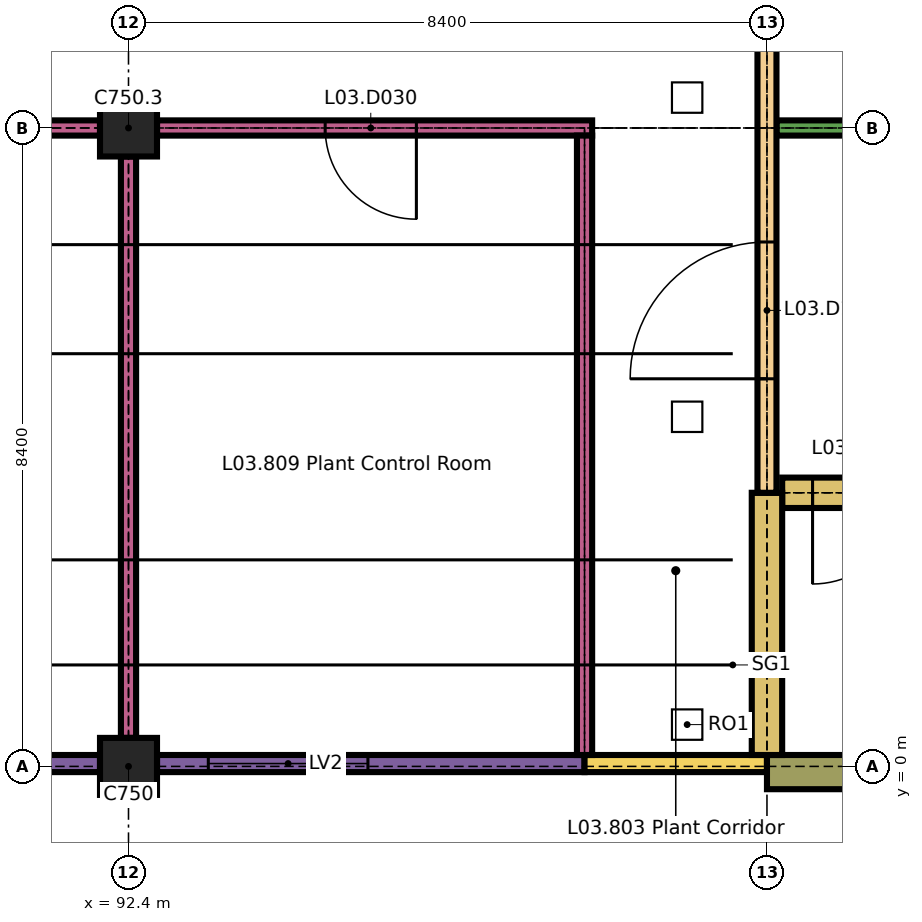
"""IFC4 building model, lengths in metres.
Left out: names, types, materials, properties, quantities, classifications, styles, units other than length and angle.
Written with IfcOpenShell. Run it as: python <this file> out.ifc"""

import sys

from ifc_helpers import new_model, si_unit, direction, frame, frame_2d, origin, origin_2d, place, context, subcontext, project, spatial, rectangle, extrude, element, fill, save


model = new_model("IFC4")
c1 = context("Model", 3, precision=1e-05, world=origin(), true_north=direction((0.0, 1.0)))
c2 = subcontext(c1, "Body", "Model", "MODEL_VIEW")
j1 = project(units=[si_unit("LENGTHUNIT", "METRE"), si_unit("PLANEANGLEUNIT", "RADIAN")], contexts=[c1])
p1 = place(None, origin())
s1 = spatial("IfcSite", under=j1, at=p1, CompositionType="ELEMENT")
p2 = place(p1, origin())
s2 = spatial("IfcBuilding", under=s1, at=p2, CompositionType="ELEMENT")
p3 = place(p2, frame((0.0, 0.0, 15.3)))
s3 = spatial("IfcBuildingStorey", under=s2, at=p3, CompositionType="ELEMENT", Elevation=15.3)
for number, where, z_axis, x_axis in (
    (1, (92.4, 0.0, 0.0), (0.0, 0.0, 1.0), (1.0, 0.0, 0.0)),
    (2, (92.4, 8.4, 0.0), (0.0, 0.0, 1.0), (1.0, 0.0, 0.0)),
):
    element("IfcColumn", number, at=place(p3, frame(where, z_axis=z_axis, x_axis=x_axis)), inside=s3, PredefinedType="COLUMN", context=c2, shape_type="SweptSolid", body=[
        extrude(rectangle(XDim=0.75, YDim=0.75, at=origin_2d()), origin(), (0.0, 0.0, 1.0), 4.0),
    ])
p4 = place(p3, frame((84.375, 0.038, 0.0), z_axis=(0.0, 0.0, 1.0), x_axis=(1.0, 0.0, 0.0)))
e3 = element("IfcWall", 3, at=p4, inside=s3, PredefinedType="SOLIDWALL", context=c2, shape_type="SweptSolid", body=[
    extrude(rectangle(XDim=7.65, YDim=0.225, at=frame_2d((3.825, 0.0))), origin(), (0.0, 0.0, 1.0), 4.0),
])
p5 = place(p4, frame((0.675, 0.0, 0.6)))
e4 = element("IfcOpeningElement", 4, at=p5, cuts=e3, PredefinedType="OPENING", context=c2, shape_type="SweptSolid", body=[
    extrude(rectangle(XDim=2.1, YDim=2.1, at=frame_2d((1.05, 1.05))), frame((0.0, 0.123, 0.0), z_axis=(0.0, -1.0, 0.0), x_axis=(1.0, 0.0, 0.0)), (0.0, 0.0, 1.0), 0.245),
])
p6 = place(p4, frame((4.875, 0.0, 0.6)))
e5 = element("IfcOpeningElement", 5, at=p6, cuts=e3, PredefinedType="OPENING", context=c2, shape_type="SweptSolid", body=[
    extrude(rectangle(XDim=2.1, YDim=2.1, at=frame_2d((1.05, 1.05))), frame((0.0, 0.123, 0.0), z_axis=(0.0, -1.0, 0.0), x_axis=(1.0, 0.0, 0.0)), (0.0, 0.0, 1.0), 0.245),
])
p7 = place(p3, frame((92.775, 0.038, 0.0), z_axis=(0.0, 0.0, 1.0), x_axis=(1.0, 0.0, 0.0)))
e6 = element("IfcWall", 6, at=p7, inside=s3, PredefinedType="SOLIDWALL", context=c2, shape_type="SweptSolid", body=[
    extrude(rectangle(XDim=5.625, YDim=0.225, at=frame_2d((2.812, 0.0))), origin(), (0.0, 0.0, 1.0), 4.0),
])
p8 = place(p7, frame((0.675, 0.0, 0.6)))
e7 = element("IfcOpeningElement", 7, at=p8, cuts=e6, PredefinedType="OPENING", context=c2, shape_type="SweptSolid", body=[
    extrude(rectangle(XDim=2.1, YDim=2.1, at=frame_2d((1.05, 1.05))), frame((0.0, 0.123, 0.0), z_axis=(0.0, -1.0, 0.0), x_axis=(1.0, 0.0, 0.0)), (0.0, 0.0, 1.0), 0.245),
])
p9 = place(p3, frame((98.4, 0.038, 0.0), z_axis=(0.0, 0.0, 1.0), x_axis=(1.0, 0.0, 0.0)))
e8 = element("IfcWall", 8, at=p9, inside=s3, PredefinedType="SOLIDWALL", context=c2, shape_type="SweptSolid", body=[
    extrude(rectangle(XDim=2.4, YDim=0.225, at=frame_2d((1.2, 0.0))), origin(), (0.0, 0.0, 1.0), 3.26),
])
p10 = place(p3, frame((100.8, -0.075, 0.0), z_axis=(0.0, 0.0, 1.0), x_axis=(1.0, 0.0, 0.0)))
e9 = element("IfcWall", 9, at=p10, inside=s3, PredefinedType="SOLIDWALL", context=c2, shape_type="SweptSolid", body=[
    extrude(rectangle(XDim=3.15, YDim=0.45, at=frame_2d((1.575, 0.0))), origin(), (0.0, 0.0, 1.0), 3.26),
])
p11 = place(p3, frame((42.21, 4.2, 4.904), z_axis=(0.0, 0.0, 1.0), x_axis=(1.0, 0.0, 0.0)))
e10 = element("IfcWall", 10, at=p11, inside=s3, PredefinedType="SOLIDWALL", context=c2, shape_type="SweptSolid", body=[
    extrude(rectangle(XDim=58.38, YDim=0.2, at=frame_2d((29.19, 0.0))), origin(), (0.0, 0.0, 1.0), 2.539),
])
p12 = place(p11, frame((1.05, 0.0, 0.3)))
e11 = element("IfcOpeningElement", 11, at=p12, cuts=e10, PredefinedType="OPENING", context=c2, shape_type="SweptSolid", body=[
    extrude(rectangle(XDim=2.1, YDim=1.8, at=frame_2d((1.05, 0.9))), frame((0.0, 0.11, 0.0), z_axis=(0.0, -1.0, 0.0), x_axis=(1.0, 0.0, 0.0)), (0.0, 0.0, 1.0), 0.22),
])
p13 = place(p11, frame((5.25, 0.0, 0.3)))
e12 = element("IfcOpeningElement", 12, at=p13, cuts=e10, PredefinedType="OPENING", context=c2, shape_type="SweptSolid", body=[
    extrude(rectangle(XDim=2.1, YDim=1.8, at=frame_2d((1.05, 0.9))), frame((0.0, 0.11, 0.0), z_axis=(0.0, -1.0, 0.0), x_axis=(1.0, 0.0, 0.0)), (0.0, 0.0, 1.0), 0.22),
])
p14 = place(p11, frame((9.45, 0.0, 0.3)))
e13 = element("IfcOpeningElement", 13, at=p14, cuts=e10, PredefinedType="OPENING", context=c2, shape_type="SweptSolid", body=[
    extrude(rectangle(XDim=2.1, YDim=1.8, at=frame_2d((1.05, 0.9))), frame((0.0, 0.11, 0.0), z_axis=(0.0, -1.0, 0.0), x_axis=(1.0, 0.0, 0.0)), (0.0, 0.0, 1.0), 0.22),
])
p15 = place(p11, frame((13.65, 0.0, 0.3)))
e14 = element("IfcOpeningElement", 14, at=p15, cuts=e10, PredefinedType="OPENING", context=c2, shape_type="SweptSolid", body=[
    extrude(rectangle(XDim=2.1, YDim=1.8, at=frame_2d((1.05, 0.9))), frame((0.0, 0.11, 0.0), z_axis=(0.0, -1.0, 0.0), x_axis=(1.0, 0.0, 0.0)), (0.0, 0.0, 1.0), 0.22),
])
p16 = place(p11, frame((17.85, 0.0, 0.3)))
e15 = element("IfcOpeningElement", 15, at=p16, cuts=e10, PredefinedType="OPENING", context=c2, shape_type="SweptSolid", body=[
    extrude(rectangle(XDim=2.1, YDim=1.8, at=frame_2d((1.05, 0.9))), frame((0.0, 0.11, 0.0), z_axis=(0.0, -1.0, 0.0), x_axis=(1.0, 0.0, 0.0)), (0.0, 0.0, 1.0), 0.22),
])
p17 = place(p11, frame((22.05, 0.0, 0.3)))
e16 = element("IfcOpeningElement", 16, at=p17, cuts=e10, PredefinedType="OPENING", context=c2, shape_type="SweptSolid", body=[
    extrude(rectangle(XDim=2.1, YDim=1.8, at=frame_2d((1.05, 0.9))), frame((0.0, 0.11, 0.0), z_axis=(0.0, -1.0, 0.0), x_axis=(1.0, 0.0, 0.0)), (0.0, 0.0, 1.0), 0.22),
])
p18 = place(p11, frame((26.25, 0.0, 0.3)))
e17 = element("IfcOpeningElement", 17, at=p18, cuts=e10, PredefinedType="OPENING", context=c2, shape_type="SweptSolid", body=[
    extrude(rectangle(XDim=2.1, YDim=1.8, at=frame_2d((1.05, 0.9))), frame((0.0, 0.11, 0.0), z_axis=(0.0, -1.0, 0.0), x_axis=(1.0, 0.0, 0.0)), (0.0, 0.0, 1.0), 0.22),
])
p19 = place(p11, frame((30.45, 0.0, 0.3)))
e18 = element("IfcOpeningElement", 18, at=p19, cuts=e10, PredefinedType="OPENING", context=c2, shape_type="SweptSolid", body=[
    extrude(rectangle(XDim=2.1, YDim=1.8, at=frame_2d((1.05, 0.9))), frame((0.0, 0.11, 0.0), z_axis=(0.0, -1.0, 0.0), x_axis=(1.0, 0.0, 0.0)), (0.0, 0.0, 1.0), 0.22),
])
p20 = place(p11, frame((34.65, 0.0, 0.3)))
e19 = element("IfcOpeningElement", 19, at=p20, cuts=e10, PredefinedType="OPENING", context=c2, shape_type="SweptSolid", body=[
    extrude(rectangle(XDim=2.1, YDim=1.8, at=frame_2d((1.05, 0.9))), frame((0.0, 0.11, 0.0), z_axis=(0.0, -1.0, 0.0), x_axis=(1.0, 0.0, 0.0)), (0.0, 0.0, 1.0), 0.22),
])
p21 = place(p11, frame((38.85, 0.0, 0.3)))
e20 = element("IfcOpeningElement", 20, at=p21, cuts=e10, PredefinedType="OPENING", context=c2, shape_type="SweptSolid", body=[
    extrude(rectangle(XDim=2.1, YDim=1.8, at=frame_2d((1.05, 0.9))), frame((0.0, 0.11, 0.0), z_axis=(0.0, -1.0, 0.0), x_axis=(1.0, 0.0, 0.0)), (0.0, 0.0, 1.0), 0.22),
])
p22 = place(p11, frame((43.05, 0.0, 0.3)))
e21 = element("IfcOpeningElement", 21, at=p22, cuts=e10, PredefinedType="OPENING", context=c2, shape_type="SweptSolid", body=[
    extrude(rectangle(XDim=2.1, YDim=1.8, at=frame_2d((1.05, 0.9))), frame((0.0, 0.11, 0.0), z_axis=(0.0, -1.0, 0.0), x_axis=(1.0, 0.0, 0.0)), (0.0, 0.0, 1.0), 0.22),
])
p23 = place(p11, frame((47.25, 0.0, 0.3)))
e22 = element("IfcOpeningElement", 22, at=p23, cuts=e10, PredefinedType="OPENING", context=c2, shape_type="SweptSolid", body=[
    extrude(rectangle(XDim=2.1, YDim=1.8, at=frame_2d((1.05, 0.9))), frame((0.0, 0.11, 0.0), z_axis=(0.0, -1.0, 0.0), x_axis=(1.0, 0.0, 0.0)), (0.0, 0.0, 1.0), 0.22),
])
p24 = place(p11, frame((51.45, 0.0, 0.3)))
e23 = element("IfcOpeningElement", 23, at=p24, cuts=e10, PredefinedType="OPENING", context=c2, shape_type="SweptSolid", body=[
    extrude(rectangle(XDim=2.1, YDim=1.8, at=frame_2d((1.05, 0.9))), frame((0.0, 0.11, 0.0), z_axis=(0.0, -1.0, 0.0), x_axis=(1.0, 0.0, 0.0)), (0.0, 0.0, 1.0), 0.22),
])
p25 = place(p11, frame((55.65, 0.0, 0.3)))
e24 = element("IfcOpeningElement", 24, at=p25, cuts=e10, PredefinedType="OPENING", context=c2, shape_type="SweptSolid", body=[
    extrude(rectangle(XDim=2.1, YDim=1.8, at=frame_2d((1.05, 0.9))), frame((0.0, 0.11, 0.0), z_axis=(0.0, -1.0, 0.0), x_axis=(1.0, 0.0, 0.0)), (0.0, 0.0, 1.0), 0.22),
])
p26 = place(p3, frame((42.21, 8.4, 4.904), z_axis=(0.0, 0.0, 1.0), x_axis=(1.0, 0.0, 0.0)))
e25 = element("IfcWall", 25, at=p26, inside=s3, PredefinedType="SOLIDWALL", context=c2, shape_type="SweptSolid", body=[
    extrude(rectangle(XDim=58.38, YDim=0.2, at=frame_2d((29.19, 0.0))), origin(), (0.0, 0.0, 1.0), 2.539),
])
p27 = place(p26, frame((1.05, 0.0, 0.3)))
e26 = element("IfcOpeningElement", 26, at=p27, cuts=e25, PredefinedType="OPENING", context=c2, shape_type="SweptSolid", body=[
    extrude(rectangle(XDim=2.1, YDim=1.8, at=frame_2d((1.05, 0.9))), frame((0.0, 0.11, 0.0), z_axis=(0.0, -1.0, 0.0), x_axis=(1.0, 0.0, 0.0)), (0.0, 0.0, 1.0), 0.22),
])
p28 = place(p26, frame((5.25, 0.0, 0.3)))
e27 = element("IfcOpeningElement", 27, at=p28, cuts=e25, PredefinedType="OPENING", context=c2, shape_type="SweptSolid", body=[
    extrude(rectangle(XDim=2.1, YDim=1.8, at=frame_2d((1.05, 0.9))), frame((0.0, 0.11, 0.0), z_axis=(0.0, -1.0, 0.0), x_axis=(1.0, 0.0, 0.0)), (0.0, 0.0, 1.0), 0.22),
])
p29 = place(p26, frame((9.45, 0.0, 0.3)))
e28 = element("IfcOpeningElement", 28, at=p29, cuts=e25, PredefinedType="OPENING", context=c2, shape_type="SweptSolid", body=[
    extrude(rectangle(XDim=2.1, YDim=1.8, at=frame_2d((1.05, 0.9))), frame((0.0, 0.11, 0.0), z_axis=(0.0, -1.0, 0.0), x_axis=(1.0, 0.0, 0.0)), (0.0, 0.0, 1.0), 0.22),
])
p30 = place(p26, frame((13.65, 0.0, 0.3)))
e29 = element("IfcOpeningElement", 29, at=p30, cuts=e25, PredefinedType="OPENING", context=c2, shape_type="SweptSolid", body=[
    extrude(rectangle(XDim=2.1, YDim=1.8, at=frame_2d((1.05, 0.9))), frame((0.0, 0.11, 0.0), z_axis=(0.0, -1.0, 0.0), x_axis=(1.0, 0.0, 0.0)), (0.0, 0.0, 1.0), 0.22),
])
p31 = place(p26, frame((17.85, 0.0, 0.3)))
e30 = element("IfcOpeningElement", 30, at=p31, cuts=e25, PredefinedType="OPENING", context=c2, shape_type="SweptSolid", body=[
    extrude(rectangle(XDim=2.1, YDim=1.8, at=frame_2d((1.05, 0.9))), frame((0.0, 0.11, 0.0), z_axis=(0.0, -1.0, 0.0), x_axis=(1.0, 0.0, 0.0)), (0.0, 0.0, 1.0), 0.22),
])
p32 = place(p26, frame((22.05, 0.0, 0.3)))
e31 = element("IfcOpeningElement", 31, at=p32, cuts=e25, PredefinedType="OPENING", context=c2, shape_type="SweptSolid", body=[
    extrude(rectangle(XDim=2.1, YDim=1.8, at=frame_2d((1.05, 0.9))), frame((0.0, 0.11, 0.0), z_axis=(0.0, -1.0, 0.0), x_axis=(1.0, 0.0, 0.0)), (0.0, 0.0, 1.0), 0.22),
])
p33 = place(p26, frame((26.25, 0.0, 0.3)))
e32 = element("IfcOpeningElement", 32, at=p33, cuts=e25, PredefinedType="OPENING", context=c2, shape_type="SweptSolid", body=[
    extrude(rectangle(XDim=2.1, YDim=1.8, at=frame_2d((1.05, 0.9))), frame((0.0, 0.11, 0.0), z_axis=(0.0, -1.0, 0.0), x_axis=(1.0, 0.0, 0.0)), (0.0, 0.0, 1.0), 0.22),
])
p34 = place(p26, frame((30.45, 0.0, 0.3)))
e33 = element("IfcOpeningElement", 33, at=p34, cuts=e25, PredefinedType="OPENING", context=c2, shape_type="SweptSolid", body=[
    extrude(rectangle(XDim=2.1, YDim=1.8, at=frame_2d((1.05, 0.9))), frame((0.0, 0.11, 0.0), z_axis=(0.0, -1.0, 0.0), x_axis=(1.0, 0.0, 0.0)), (0.0, 0.0, 1.0), 0.22),
])
p35 = place(p26, frame((34.65, 0.0, 0.3)))
e34 = element("IfcOpeningElement", 34, at=p35, cuts=e25, PredefinedType="OPENING", context=c2, shape_type="SweptSolid", body=[
    extrude(rectangle(XDim=2.1, YDim=1.8, at=frame_2d((1.05, 0.9))), frame((0.0, 0.11, 0.0), z_axis=(0.0, -1.0, 0.0), x_axis=(1.0, 0.0, 0.0)), (0.0, 0.0, 1.0), 0.22),
])
p36 = place(p26, frame((38.85, 0.0, 0.3)))
e35 = element("IfcOpeningElement", 35, at=p36, cuts=e25, PredefinedType="OPENING", context=c2, shape_type="SweptSolid", body=[
    extrude(rectangle(XDim=2.1, YDim=1.8, at=frame_2d((1.05, 0.9))), frame((0.0, 0.11, 0.0), z_axis=(0.0, -1.0, 0.0), x_axis=(1.0, 0.0, 0.0)), (0.0, 0.0, 1.0), 0.22),
])
p37 = place(p26, frame((43.05, 0.0, 0.3)))
e36 = element("IfcOpeningElement", 36, at=p37, cuts=e25, PredefinedType="OPENING", context=c2, shape_type="SweptSolid", body=[
    extrude(rectangle(XDim=2.1, YDim=1.8, at=frame_2d((1.05, 0.9))), frame((0.0, 0.11, 0.0), z_axis=(0.0, -1.0, 0.0), x_axis=(1.0, 0.0, 0.0)), (0.0, 0.0, 1.0), 0.22),
])
p38 = place(p26, frame((47.25, 0.0, 0.3)))
e37 = element("IfcOpeningElement", 37, at=p38, cuts=e25, PredefinedType="OPENING", context=c2, shape_type="SweptSolid", body=[
    extrude(rectangle(XDim=2.1, YDim=1.8, at=frame_2d((1.05, 0.9))), frame((0.0, 0.11, 0.0), z_axis=(0.0, -1.0, 0.0), x_axis=(1.0, 0.0, 0.0)), (0.0, 0.0, 1.0), 0.22),
])
p39 = place(p26, frame((51.45, 0.0, 0.3)))
e38 = element("IfcOpeningElement", 38, at=p39, cuts=e25, PredefinedType="OPENING", context=c2, shape_type="SweptSolid", body=[
    extrude(rectangle(XDim=2.1, YDim=1.8, at=frame_2d((1.05, 0.9))), frame((0.0, 0.11, 0.0), z_axis=(0.0, -1.0, 0.0), x_axis=(1.0, 0.0, 0.0)), (0.0, 0.0, 1.0), 0.22),
])
p40 = place(p26, frame((55.65, 0.0, 0.3)))
e39 = element("IfcOpeningElement", 39, at=p40, cuts=e25, PredefinedType="OPENING", context=c2, shape_type="SweptSolid", body=[
    extrude(rectangle(XDim=2.1, YDim=1.8, at=frame_2d((1.05, 0.9))), frame((0.0, 0.11, 0.0), z_axis=(0.0, -1.0, 0.0), x_axis=(1.0, 0.0, 0.0)), (0.0, 0.0, 1.0), 0.22),
])
p41 = place(p3, frame((101.0, 3.6, 0.0), z_axis=(0.0, 0.0, 1.0), x_axis=(1.0, 0.0, 0.0)))
e40 = element("IfcWall", 40, at=p41, inside=s3, PredefinedType="SHEAR", context=c2, shape_type="SweptSolid", body=[
    extrude(rectangle(XDim=8.0, YDim=0.4, at=frame_2d((4.0, 0.0))), origin(), (0.0, 0.0, 1.0), 3.26),
])
p42 = place(p41, frame((0.4, 0.0, 0.0)))
e41 = element("IfcOpeningElement", 41, at=p42, cuts=e40, PredefinedType="OPENING", context=c2, shape_type="SweptSolid", body=[
    extrude(rectangle(XDim=1.2, YDim=2.1, at=frame_2d((0.6, 1.05))), frame((0.0, 0.21, 0.0), z_axis=(0.0, -1.0, 0.0), x_axis=(1.0, 0.0, 0.0)), (0.0, 0.0, 1.0), 0.42),
])
p43 = place(p3, frame((84.375, 8.4, 0.0), z_axis=(0.0, 0.0, 1.0), x_axis=(1.0, 0.0, 0.0)))
e42 = element("IfcWall", 42, at=p43, inside=s3, PredefinedType="PARTITIONING", context=c2, shape_type="SweptSolid", body=[
    extrude(rectangle(XDim=7.65, YDim=0.2, at=frame_2d((3.825, 0.0))), origin(), (0.0, 0.0, 1.0), 4.0),
])
p44 = place(p3, frame((92.775, 8.4, 0.0), z_axis=(0.0, 0.0, 1.0), x_axis=(1.0, 0.0, 0.0)))
e43 = element("IfcWall", 43, at=p44, inside=s3, PredefinedType="PARTITIONING", context=c2, shape_type="SweptSolid", body=[
    extrude(rectangle(XDim=5.725, YDim=0.2, at=frame_2d((2.863, 0.0))), origin(), (0.0, 0.0, 1.0), 4.0),
])
p45 = place(p44, frame((2.212, 0.0, 0.0)))
e44 = element("IfcOpeningElement", 44, at=p45, cuts=e43, PredefinedType="OPENING", context=c2, shape_type="SweptSolid", body=[
    extrude(rectangle(XDim=1.2, YDim=2.1, at=frame_2d((0.6, 1.05))), frame((0.0, 0.11, 0.0), z_axis=(0.0, -1.0, 0.0), x_axis=(1.0, 0.0, 0.0)), (0.0, 0.0, 1.0), 0.22),
])
p46 = place(p3, frame((100.925, 8.4, 0.0), z_axis=(0.0, 0.0, 1.0), x_axis=(1.0, 0.0, 0.0)))
e45 = element("IfcWall", 45, at=p46, inside=s3, PredefinedType="PARTITIONING", context=c2, shape_type="SweptSolid", body=[
    extrude(rectangle(XDim=8.175, YDim=0.2, at=frame_2d((4.087, 0.0))), origin(), (0.0, 0.0, 1.0), 3.26),
])
p47 = place(p46, frame((3.087, 0.0, 0.0)))
e46 = element("IfcOpeningElement", 46, at=p47, cuts=e45, PredefinedType="OPENING", context=c2, shape_type="SweptSolid", body=[
    extrude(rectangle(XDim=2.0, YDim=2.4, at=frame_2d((1.0, 1.2))), frame((0.0, 0.11, 0.0), z_axis=(0.0, -1.0, 0.0), x_axis=(1.0, 0.0, 0.0)), (0.0, 0.0, 1.0), 0.22),
])
p48 = place(p3, frame((92.4, 0.375, 0.0), z_axis=(0.0, 0.0, 1.0), x_axis=(0.0, 1.0, 0.0)))
e47 = element("IfcWall", 47, at=p48, inside=s3, PredefinedType="PARTITIONING", context=c2, shape_type="SweptSolid", body=[
    extrude(rectangle(XDim=7.65, YDim=0.2, at=frame_2d((3.825, 0.0))), origin(), (0.0, 0.0, 1.0), 4.0),
])
p49 = place(p3, frame((98.4, 0.15, 0.0), z_axis=(0.0, 0.0, 1.0), x_axis=(0.0, 1.0, 0.0)))
e48 = element("IfcWall", 48, at=p49, inside=s3, PredefinedType="PARTITIONING", context=c2, shape_type="SweptSolid", body=[
    extrude(rectangle(XDim=8.15, YDim=0.2, at=frame_2d((4.075, 0.0))), origin(), (0.0, 0.0, 1.0), 4.0),
])
p50 = place(p3, frame((100.8, 0.15, 0.0), z_axis=(0.0, 0.0, 1.0), x_axis=(0.0, 1.0, 0.0)))
e49 = element("IfcWall", 49, at=p50, inside=s3, PredefinedType="SHEAR", context=c2, shape_type="SweptSolid", body=[
    extrude(rectangle(XDim=3.45, YDim=0.4, at=frame_2d((1.725, 0.0))), origin(), (0.0, 0.0, 1.0), 3.26),
])
p51 = place(p3, frame((100.8, 3.6, 0.0), z_axis=(0.0, 0.0, 1.0), x_axis=(0.0, 1.0, 0.0)))
e50 = element("IfcWall", 50, at=p51, inside=s3, PredefinedType="SOLIDWALL", context=c2, shape_type="SweptSolid", body=[
    extrude(rectangle(XDim=12.825, YDim=0.25, at=frame_2d((6.413, 0.0))), origin(), (0.0, 0.0, 1.0), 3.26),
])
p52 = place(p51, frame((1.5, 0.0, 0.0)))
e51 = element("IfcOpeningElement", 51, at=p52, cuts=e50, PredefinedType="OPENING", context=c2, shape_type="SweptSolid", body=[
    extrude(rectangle(XDim=1.8, YDim=2.4, at=frame_2d((0.9, 1.2))), frame((0.0, 0.135, 0.0), z_axis=(0.0, -1.0, 0.0), x_axis=(1.0, 0.0, 0.0)), (0.0, 0.0, 1.0), 0.27),
])
p53 = place(p8, origin())
e52 = element("IfcWindow", 52, at=p53, inside=s3, PartitioningType="SINGLE_PANEL", PredefinedType="WINDOW", context=c2, shape_type="SweptSolid", body=[
    extrude(rectangle(XDim=2.1, YDim=2.1, at=frame_2d((1.05, 1.05))), frame((0.0, 0.075, 0.0), z_axis=(0.0, -1.0, 0.0), x_axis=(1.0, 0.0, 0.0)), (0.0, 0.0, 1.0), 0.15),
])
fill(e7, e52)
p54 = place(p23, origin())
e53 = element("IfcWindow", 53, at=p54, inside=s3, PartitioningType="SINGLE_PANEL", PredefinedType="WINDOW", context=c2, shape_type="SweptSolid", body=[
    extrude(rectangle(XDim=2.1, YDim=1.8, at=frame_2d((1.05, 0.9))), frame((0.0, 0.075, 0.0), z_axis=(0.0, -1.0, 0.0), x_axis=(1.0, 0.0, 0.0)), (0.0, 0.0, 1.0), 0.15),
])
fill(e22, e53)
p55 = place(p24, origin())
e54 = element("IfcWindow", 54, at=p55, inside=s3, PartitioningType="SINGLE_PANEL", PredefinedType="WINDOW", context=c2, shape_type="SweptSolid", body=[
    extrude(rectangle(XDim=2.1, YDim=1.8, at=frame_2d((1.05, 0.9))), frame((0.0, 0.075, 0.0), z_axis=(0.0, -1.0, 0.0), x_axis=(1.0, 0.0, 0.0)), (0.0, 0.0, 1.0), 0.15),
])
fill(e23, e54)
p56 = place(p25, origin())
e55 = element("IfcWindow", 55, at=p56, inside=s3, PartitioningType="SINGLE_PANEL", PredefinedType="WINDOW", context=c2, shape_type="SweptSolid", body=[
    extrude(rectangle(XDim=2.1, YDim=1.8, at=frame_2d((1.05, 0.9))), frame((0.0, 0.075, 0.0), z_axis=(0.0, -1.0, 0.0), x_axis=(1.0, 0.0, 0.0)), (0.0, 0.0, 1.0), 0.15),
])
fill(e24, e55)
p57 = place(p38, origin())
e56 = element("IfcWindow", 56, at=p57, inside=s3, PartitioningType="SINGLE_PANEL", PredefinedType="WINDOW", context=c2, shape_type="SweptSolid", body=[
    extrude(rectangle(XDim=2.1, YDim=1.8, at=frame_2d((1.05, 0.9))), frame((0.0, 0.075, 0.0), z_axis=(0.0, -1.0, 0.0), x_axis=(1.0, 0.0, 0.0)), (0.0, 0.0, 1.0), 0.15),
])
fill(e37, e56)
p58 = place(p39, origin())
e57 = element("IfcWindow", 57, at=p58, inside=s3, PartitioningType="SINGLE_PANEL", PredefinedType="WINDOW", context=c2, shape_type="SweptSolid", body=[
    extrude(rectangle(XDim=2.1, YDim=1.8, at=frame_2d((1.05, 0.9))), frame((0.0, 0.075, 0.0), z_axis=(0.0, -1.0, 0.0), x_axis=(1.0, 0.0, 0.0)), (0.0, 0.0, 1.0), 0.15),
])
fill(e38, e57)
p59 = place(p40, origin())
e58 = element("IfcWindow", 58, at=p59, inside=s3, PartitioningType="SINGLE_PANEL", PredefinedType="WINDOW", context=c2, shape_type="SweptSolid", body=[
    extrude(rectangle(XDim=2.1, YDim=1.8, at=frame_2d((1.05, 0.9))), frame((0.0, 0.075, 0.0), z_axis=(0.0, -1.0, 0.0), x_axis=(1.0, 0.0, 0.0)), (0.0, 0.0, 1.0), 0.15),
])
fill(e39, e58)
p60 = place(p42, origin())
e59 = element("IfcDoor", 59, at=p60, inside=s3, OperationType="SINGLE_SWING_LEFT", PredefinedType="DOOR", context=c2, shape_type="SweptSolid", body=[
    extrude(rectangle(XDim=1.2, YDim=2.1, at=frame_2d((0.6, 1.05))), frame((0.0, 0.025, 0.0), z_axis=(0.0, -1.0, 0.0), x_axis=(1.0, 0.0, 0.0)), (0.0, 0.0, 1.0), 0.05),
])
fill(e41, e59)
p61 = place(p45, origin())
e60 = element("IfcDoor", 60, at=p61, inside=s3, OperationType="SINGLE_SWING_RIGHT", PredefinedType="DOOR", context=c2, shape_type="SweptSolid", body=[
    extrude(rectangle(XDim=1.2, YDim=2.1, at=frame_2d((0.6, 1.05))), frame((0.0, 0.025, 0.0), z_axis=(0.0, -1.0, 0.0), x_axis=(1.0, 0.0, 0.0)), (0.0, 0.0, 1.0), 0.05),
])
fill(e44, e60)
p62 = place(p52, origin())
e61 = element("IfcDoor", 61, at=p62, inside=s3, OperationType="SINGLE_SWING_RIGHT", PredefinedType="DOOR", context=c2, shape_type="SweptSolid", body=[
    extrude(rectangle(XDim=1.8, YDim=2.4, at=frame_2d((0.9, 1.2))), frame((0.0, 0.03, 0.0), z_axis=(0.0, -1.0, 0.0), x_axis=(1.0, 0.0, 0.0)), (0.0, 0.0, 1.0), 0.06),
])
fill(e51, e61)
save(model, sys.argv[1])
